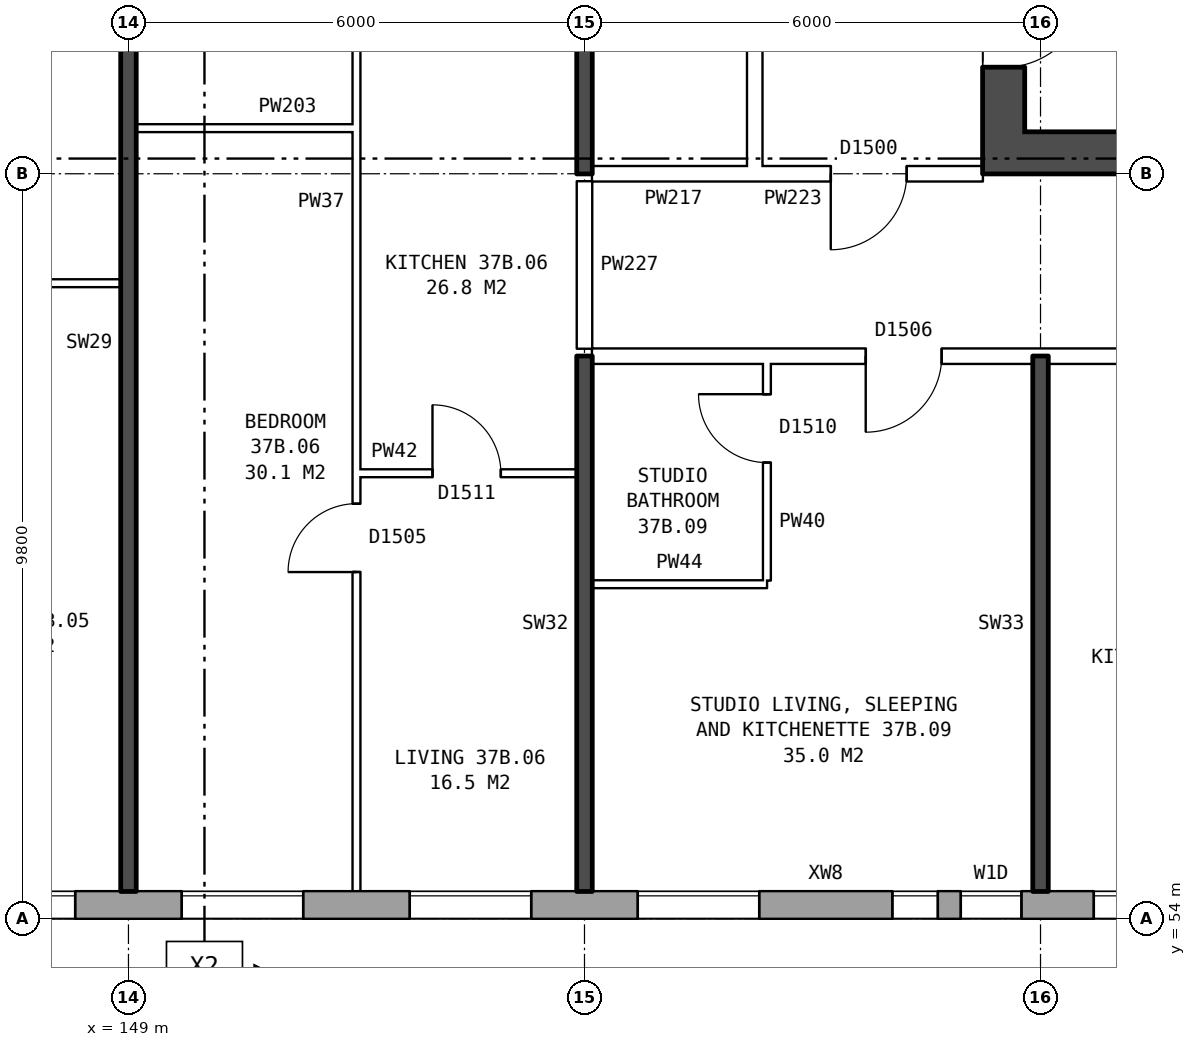
"""IFC4 building model, lengths in metres.
Left out: names, types, materials, properties, quantities, classifications, styles, units other than length and angle.
Written with IfcOpenShell. Run it as: python <this file> out.ifc"""

import sys

from ifc_helpers import new_model, si_unit, direction, frame, frame_2d, origin, place, context, subcontext, project, spatial, rectangle, extrude, element, fill, save


model = new_model("IFC4")
c1 = context("Model", 3, precision=1e-05, world=origin(), true_north=direction((0.0, 1.0)))
c2 = subcontext(c1, "Body", "Model", "MODEL_VIEW")
j1 = project(units=[si_unit("LENGTHUNIT", "METRE"), si_unit("PLANEANGLEUNIT", "RADIAN")], contexts=[c1])
p1 = place(None, origin())
s1 = spatial("IfcSite", under=j1, at=p1, CompositionType="ELEMENT")
p2 = place(p1, origin())
s2 = spatial("IfcBuilding", under=s1, at=p2, CompositionType="ELEMENT")
p3 = place(p2, frame((0.0, 0.0, 133.0)))
s3 = spatial("IfcBuildingStorey", under=s2, at=p3, CompositionType="ELEMENT", Elevation=133.0)
p4 = place(p3, frame((134.075, 54.18, 0.0), z_axis=(0.0, 0.0, 1.0), x_axis=(1.0, 0.0, 0.0)))
e1 = element("IfcWall", 1, at=p4, inside=s3, PredefinedType="STANDARD", context=c2, shape_type="SweptSolid", body=[
    extrude(rectangle(XDim=35.601, YDim=0.36, at=frame_2d((17.8, 0.0))), origin(), (0.0, 0.0, 1.0), 2.85),
])
p5 = place(p4, frame((0.625, 0.0, 0.8)))
e2 = element("IfcOpeningElement", 2, at=p5, cuts=e1, PredefinedType="OPENING", context=c2, shape_type="SweptSolid", body=[
    extrude(rectangle(XDim=1.6, YDim=1.8, at=frame_2d((0.8, 0.9))), frame((0.0, 0.19, 0.0), z_axis=(0.0, -1.0, 0.0), x_axis=(1.0, 0.0, 0.0)), (0.0, 0.0, 1.0), 0.38),
])
p6 = place(p4, frame((3.625, 0.0, 0.8)))
e3 = element("IfcOpeningElement", 3, at=p6, cuts=e1, PredefinedType="OPENING", context=c2, shape_type="SweptSolid", body=[
    extrude(rectangle(XDim=1.6, YDim=1.8, at=frame_2d((0.8, 0.9))), frame((0.0, 0.19, 0.0), z_axis=(0.0, -1.0, 0.0), x_axis=(1.0, 0.0, 0.0)), (0.0, 0.0, 1.0), 0.38),
])
p7 = place(p4, frame((6.625, 0.0, 0.8)))
e4 = element("IfcOpeningElement", 4, at=p7, cuts=e1, PredefinedType="OPENING", context=c2, shape_type="SweptSolid", body=[
    extrude(rectangle(XDim=1.6, YDim=1.8, at=frame_2d((0.8, 0.9))), frame((0.0, 0.19, 0.0), z_axis=(0.0, -1.0, 0.0), x_axis=(1.0, 0.0, 0.0)), (0.0, 0.0, 1.0), 0.38),
])
p8 = place(p4, frame((9.125, 0.0, 1.35)))
e5 = element("IfcOpeningElement", 5, at=p8, cuts=e1, PredefinedType="OPENING", context=c2, shape_type="SweptSolid", body=[
    extrude(rectangle(XDim=1.2, YDim=1.2, at=frame_2d((0.6, 0.6))), frame((0.0, 0.19, 0.0), z_axis=(0.0, -1.0, 0.0), x_axis=(1.0, 0.0, 0.0)), (0.0, 0.0, 1.0), 0.38),
])
p9 = place(p4, frame((12.625, 0.0, 0.8)))
e6 = element("IfcOpeningElement", 6, at=p9, cuts=e1, PredefinedType="OPENING", context=c2, shape_type="SweptSolid", body=[
    extrude(rectangle(XDim=1.6, YDim=1.8, at=frame_2d((0.8, 0.9))), frame((0.0, 0.19, 0.0), z_axis=(0.0, -1.0, 0.0), x_axis=(1.0, 0.0, 0.0)), (0.0, 0.0, 1.0), 0.38),
])
p10 = place(p4, frame((15.625, 0.0, 0.8)))
e7 = element("IfcOpeningElement", 7, at=p10, cuts=e1, PredefinedType="OPENING", context=c2, shape_type="SweptSolid", body=[
    extrude(rectangle(XDim=1.6, YDim=1.8, at=frame_2d((0.8, 0.9))), frame((0.0, 0.19, 0.0), z_axis=(0.0, -1.0, 0.0), x_axis=(1.0, 0.0, 0.0)), (0.0, 0.0, 1.0), 0.38),
])
p11 = place(p4, frame((18.625, 0.0, 0.8)))
e8 = element("IfcOpeningElement", 8, at=p11, cuts=e1, PredefinedType="OPENING", context=c2, shape_type="SweptSolid", body=[
    extrude(rectangle(XDim=1.6, YDim=1.8, at=frame_2d((0.8, 0.9))), frame((0.0, 0.19, 0.0), z_axis=(0.0, -1.0, 0.0), x_axis=(1.0, 0.0, 0.0)), (0.0, 0.0, 1.0), 0.38),
])
p12 = place(p4, frame((21.625, 0.0, 0.8)))
e9 = element("IfcOpeningElement", 9, at=p12, cuts=e1, PredefinedType="OPENING", context=c2, shape_type="SweptSolid", body=[
    extrude(rectangle(XDim=1.6, YDim=1.8, at=frame_2d((0.8, 0.9))), frame((0.0, 0.19, 0.0), z_axis=(0.0, -1.0, 0.0), x_axis=(1.0, 0.0, 0.0)), (0.0, 0.0, 1.0), 0.38),
])
p13 = place(p4, frame((24.975, 0.0, 1.7)))
e10 = element("IfcOpeningElement", 10, at=p13, cuts=e1, PredefinedType="OPENING", context=c2, shape_type="SweptSolid", body=[
    extrude(rectangle(XDim=0.6, YDim=0.9, at=frame_2d((0.3, 0.45))), frame((0.0, 0.19, 0.0), z_axis=(0.0, -1.0, 0.0), x_axis=(1.0, 0.0, 0.0)), (0.0, 0.0, 1.0), 0.38),
])
p14 = place(p4, frame((27.625, 0.0, 0.8)))
e11 = element("IfcOpeningElement", 11, at=p14, cuts=e1, PredefinedType="OPENING", context=c2, shape_type="SweptSolid", body=[
    extrude(rectangle(XDim=1.6, YDim=1.8, at=frame_2d((0.8, 0.9))), frame((0.0, 0.19, 0.0), z_axis=(0.0, -1.0, 0.0), x_axis=(1.0, 0.0, 0.0)), (0.0, 0.0, 1.0), 0.38),
])
p15 = place(p4, frame((30.625, 0.0, 0.8)))
e12 = element("IfcOpeningElement", 12, at=p15, cuts=e1, PredefinedType="OPENING", context=c2, shape_type="SweptSolid", body=[
    extrude(rectangle(XDim=1.6, YDim=1.8, at=frame_2d((0.8, 0.9))), frame((0.0, 0.19, 0.0), z_axis=(0.0, -1.0, 0.0), x_axis=(1.0, 0.0, 0.0)), (0.0, 0.0, 1.0), 0.38),
])
p16 = place(p4, frame((33.625, 0.0, 0.8)))
e13 = element("IfcOpeningElement", 13, at=p16, cuts=e1, PredefinedType="OPENING", context=c2, shape_type="SweptSolid", body=[
    extrude(rectangle(XDim=1.6, YDim=1.8, at=frame_2d((0.8, 0.9))), frame((0.0, 0.19, 0.0), z_axis=(0.0, -1.0, 0.0), x_axis=(1.0, 0.0, 0.0)), (0.0, 0.0, 1.0), 0.38),
])
p17 = place(p4, frame((11.125, 0.0, 0.15)))
e14 = element("IfcOpeningElement", 14, at=p17, cuts=e1, PredefinedType="OPENING", context=c2, shape_type="SweptSolid", body=[
    extrude(rectangle(XDim=0.6, YDim=0.9, at=frame_2d((0.3, 0.45))), frame((0.0, 0.19, 0.0), z_axis=(0.0, -1.0, 0.0), x_axis=(1.0, 0.0, 0.0)), (0.0, 0.0, 1.0), 0.38),
])
p18 = place(p4, frame((25.875, 0.0, 0.8)))
e15 = element("IfcOpeningElement", 15, at=p18, cuts=e1, PredefinedType="OPENING", context=c2, shape_type="SweptSolid", body=[
    extrude(rectangle(XDim=0.8, YDim=1.8, at=frame_2d((0.4, 0.9))), frame((0.0, 0.19, 0.0), z_axis=(0.0, -1.0, 0.0), x_axis=(1.0, 0.0, 0.0)), (0.0, 0.0, 1.0), 0.38),
])
p19 = place(p3, frame((160.515, 76.2, 0.0), z_axis=(0.0, 0.0, 1.0), x_axis=(0.0, -1.0, 0.0)))
e16 = element("IfcWall", 16, at=p19, inside=s3, PredefinedType="SHEAR", context=c2, shape_type="SweptSolid", body=[
    extrude(rectangle(XDim=12.4, YDim=0.55, at=frame_2d((6.2, 0.0))), origin(), (0.0, 0.0, 1.0), 2.85),
])
p20 = place(p19, frame((1.325, 0.0, 0.0)))
e17 = element("IfcOpeningElement", 17, at=p20, cuts=e16, PredefinedType="OPENING", context=c2, shape_type="SweptSolid", body=[
    extrude(rectangle(XDim=1.1, YDim=2.1, at=frame_2d((0.55, 1.05))), frame((0.0, 0.285, 0.0), z_axis=(0.0, -1.0, 0.0), x_axis=(1.0, 0.0, 0.0)), (0.0, 0.0, 1.0), 0.57),
])
p21 = place(p19, frame((4.025, 0.0, 0.0)))
e18 = element("IfcOpeningElement", 18, at=p21, cuts=e16, PredefinedType="OPENING", context=c2, shape_type="SweptSolid", body=[
    extrude(rectangle(XDim=0.85, YDim=2.1, at=frame_2d((0.425, 1.05))), frame((0.0, 0.285, 0.0), z_axis=(0.0, -1.0, 0.0), x_axis=(1.0, 0.0, 0.0)), (0.0, 0.0, 1.0), 0.57),
])
p22 = place(p19, frame((6.175, 0.0, 0.0)))
e19 = element("IfcOpeningElement", 19, at=p22, cuts=e16, PredefinedType="OPENING", context=c2, shape_type="SweptSolid", body=[
    extrude(rectangle(XDim=0.85, YDim=2.1, at=frame_2d((0.425, 1.05))), frame((0.0, 0.285, 0.0), z_axis=(0.0, -1.0, 0.0), x_axis=(1.0, 0.0, 0.0)), (0.0, 0.0, 1.0), 0.57),
])
p23 = place(p19, frame((9.9, 0.0, 0.0)))
e20 = element("IfcOpeningElement", 20, at=p23, cuts=e16, PredefinedType="OPENING", context=c2, shape_type="SweptSolid", body=[
    extrude(rectangle(XDim=1.1, YDim=2.1, at=frame_2d((0.55, 1.05))), frame((0.0, 0.285, 0.0), z_axis=(0.0, -1.0, 0.0), x_axis=(1.0, 0.0, 0.0)), (0.0, 0.0, 1.0), 0.57),
])
p24 = place(p19, frame((8.125, 0.0, 0.0)))
e21 = element("IfcOpeningElement", 21, at=p24, cuts=e16, PredefinedType="OPENING", context=c2, shape_type="SweptSolid", body=[
    extrude(rectangle(XDim=0.85, YDim=2.1, at=frame_2d((0.425, 1.05))), frame((0.0, 0.285, 0.0), z_axis=(0.0, -1.0, 0.0), x_axis=(1.0, 0.0, 0.0)), (0.0, 0.0, 1.0), 0.57),
])
p25 = place(p3, frame((160.79, 64.075, 0.0), z_axis=(0.0, 0.0, 1.0), x_axis=(1.0, 0.0, 0.0)))
e22 = element("IfcWall", 22, at=p25, inside=s3, PredefinedType="SHEAR", context=c2, shape_type="SweptSolid", body=[
    extrude(rectangle(XDim=7.3, YDim=0.55, at=frame_2d((3.65, 0.0))), origin(), (0.0, 0.0, 1.0), 2.85),
])
p26 = place(p3, frame((157.24, 63.9, 0.0), z_axis=(0.0, 0.0, 1.0), x_axis=(0.0, 1.0, 0.0)))
e23 = element("IfcWall", 23, at=p26, inside=s3, PredefinedType="PARTITIONING", context=c2, shape_type="SweptSolid", body=[
    extrude(rectangle(XDim=12.2, YDim=0.2, at=frame_2d((6.1, 0.0))), origin(), (0.0, 0.0, 1.0), 2.85),
])
p27 = place(p26, frame((5.1, 0.0, 0.0)))
e24 = element("IfcOpeningElement", 24, at=p27, cuts=e23, PredefinedType="OPENING", context=c2, shape_type="SweptSolid", body=[
    extrude(rectangle(XDim=2.0, YDim=2.1, at=frame_2d((1.0, 1.05))), frame((0.0, 0.11, 0.0), z_axis=(0.0, -1.0, 0.0), x_axis=(1.0, 0.0, 0.0)), (0.0, 0.0, 1.0), 0.22),
])
p28 = place(p3, frame((155.1, 58.4, 0.0), z_axis=(0.0, 0.0, 1.0), x_axis=(1.0, 0.0, 0.0)))
e25 = element("IfcWall", 25, at=p28, inside=s3, PredefinedType="PARTITIONING", context=c2, shape_type="SweptSolid", body=[
    extrude(rectangle(XDim=2.3, YDim=0.1, at=frame_2d((1.15, 0.0))), origin(), (0.0, 0.0, 1.0), 2.85),
])
p29 = place(p3, frame((152.0, 59.86, 0.0), z_axis=(0.0, 0.0, 1.0), x_axis=(1.0, 0.0, 0.0)))
e26 = element("IfcWall", 26, at=p29, inside=s3, PredefinedType="PARTITIONING", context=c2, shape_type="SweptSolid", body=[
    extrude(rectangle(XDim=2.9, YDim=0.1, at=frame_2d((1.45, 0.0))), origin(), (0.0, 0.0, 1.0), 2.85),
])
p30 = place(p29, frame((1.0, 0.0, 0.0)))
e27 = element("IfcOpeningElement", 27, at=p30, cuts=e26, PredefinedType="OPENING", context=c2, shape_type="SweptSolid", body=[
    extrude(rectangle(XDim=0.9, YDim=2.1, at=frame_2d((0.45, 1.05))), frame((0.0, 0.06, 0.0), z_axis=(0.0, -1.0, 0.0), x_axis=(1.0, 0.0, 0.0)), (0.0, 0.0, 1.0), 0.12),
])
p31 = place(p3, frame((155.1, 61.4, 0.0), z_axis=(0.0, 0.0, 1.0), x_axis=(1.0, 0.0, 0.0)))
e28 = element("IfcWall", 28, at=p31, inside=s3, PredefinedType="PARTITIONING", context=c2, shape_type="SweptSolid", body=[
    extrude(rectangle(XDim=17.29, YDim=0.2, at=frame_2d((8.645, 0.0))), origin(), (0.0, 0.0, 1.0), 2.85),
])
p32 = place(p31, frame((3.6, 0.0, 0.0)))
e29 = element("IfcOpeningElement", 29, at=p32, cuts=e28, PredefinedType="OPENING", context=c2, shape_type="SweptSolid", body=[
    extrude(rectangle(XDim=1.0, YDim=2.1, at=frame_2d((0.5, 1.05))), frame((0.0, 0.11, 0.0), z_axis=(0.0, -1.0, 0.0), x_axis=(1.0, 0.0, 0.0)), (0.0, 0.0, 1.0), 0.22),
])
p33 = place(p31, frame((8.4, 0.0, 0.0)))
e30 = element("IfcOpeningElement", 30, at=p33, cuts=e28, PredefinedType="OPENING", context=c2, shape_type="SweptSolid", body=[
    extrude(rectangle(XDim=1.0, YDim=2.1, at=frame_2d((0.5, 1.05))), frame((0.0, 0.11, 0.0), z_axis=(0.0, -1.0, 0.0), x_axis=(1.0, 0.0, 0.0)), (0.0, 0.0, 1.0), 0.22),
])
p34 = place(p3, frame((146.0, 62.36, 0.0), z_axis=(0.0, 0.0, 1.0), x_axis=(1.0, 0.0, 0.0)))
e31 = element("IfcWall", 31, at=p34, inside=s3, PredefinedType="PARTITIONING", context=c2, shape_type="SweptSolid", body=[
    extrude(rectangle(XDim=2.9, YDim=0.1, at=frame_2d((1.45, 0.0))), origin(), (0.0, 0.0, 1.0), 2.85),
])
p35 = place(p34, frame((1.0, 0.0, 0.0)))
e32 = element("IfcOpeningElement", 32, at=p35, cuts=e31, PredefinedType="OPENING", context=c2, shape_type="SweptSolid", body=[
    extrude(rectangle(XDim=0.9, YDim=2.1, at=frame_2d((0.45, 1.05))), frame((0.0, 0.06, 0.0), z_axis=(0.0, -1.0, 0.0), x_axis=(1.0, 0.0, 0.0)), (0.0, 0.0, 1.0), 0.12),
])
p36 = place(p3, frame((155.1, 63.8, 0.0), z_axis=(0.0, 0.0, 1.0), x_axis=(1.0, 0.0, 0.0)))
e33 = element("IfcWall", 33, at=p36, inside=s3, PredefinedType="PARTITIONING", context=c2, shape_type="SweptSolid", body=[
    extrude(rectangle(XDim=2.14, YDim=0.2, at=frame_2d((1.07, 0.0))), origin(), (0.0, 0.0, 1.0), 2.85),
])
p37 = place(p3, frame((157.24, 63.8, 0.0), z_axis=(0.0, 0.0, 1.0), x_axis=(1.0, 0.0, 0.0)))
e34 = element("IfcWall", 34, at=p37, inside=s3, PredefinedType="PARTITIONING", context=c2, shape_type="SweptSolid", body=[
    extrude(rectangle(XDim=3.0, YDim=0.2, at=frame_2d((1.5, 0.0))), origin(), (0.0, 0.0, 1.0), 2.85),
])
p38 = place(p37, frame((1.0, 0.0, 0.0)))
e35 = element("IfcOpeningElement", 35, at=p38, cuts=e34, PredefinedType="OPENING", context=c2, shape_type="SweptSolid", body=[
    extrude(rectangle(XDim=1.0, YDim=2.1, at=frame_2d((0.5, 1.05))), frame((0.0, 0.11, 0.0), z_axis=(0.0, -1.0, 0.0), x_axis=(1.0, 0.0, 0.0)), (0.0, 0.0, 1.0), 0.22),
])
p39 = place(p3, frame((149.1, 64.4, 0.0), z_axis=(0.0, 0.0, 1.0), x_axis=(1.0, 0.0, 0.0)))
e36 = element("IfcWall", 36, at=p39, inside=s3, PredefinedType="PARTITIONING", context=c2, shape_type="SweptSolid", body=[
    extrude(rectangle(XDim=2.9, YDim=0.1, at=frame_2d((1.45, 0.0))), origin(), (0.0, 0.0, 1.0), 2.85),
])
p40 = place(p3, frame((149.0, 54.36, 0.0), z_axis=(0.0, 0.0, 1.0), x_axis=(0.0, 1.0, 0.0)))
e37 = element("IfcWall", 37, at=p40, inside=s3, PredefinedType="SOLIDWALL", context=c2, shape_type="SweptSolid", body=[
    extrude(rectangle(XDim=14.44, YDim=0.2, at=frame_2d((7.22, 0.0))), origin(), (0.0, 0.0, 1.0), 2.85),
])
p41 = place(p3, frame((152.0, 54.36, 0.0), z_axis=(0.0, 0.0, 1.0), x_axis=(0.0, 1.0, 0.0)))
e38 = element("IfcWall", 38, at=p41, inside=s3, PredefinedType="PARTITIONING", context=c2, shape_type="SweptSolid", body=[
    extrude(rectangle(XDim=14.34, YDim=0.1, at=frame_2d((7.17, 0.0))), origin(), (0.0, 0.0, 1.0), 2.85),
])
p42 = place(p41, frame((4.2, 0.0, 0.0)))
e39 = element("IfcOpeningElement", 39, at=p42, cuts=e38, PredefinedType="OPENING", context=c2, shape_type="SweptSolid", body=[
    extrude(rectangle(XDim=0.9, YDim=2.1, at=frame_2d((0.45, 1.05))), frame((0.0, 0.06, 0.0), z_axis=(0.0, -1.0, 0.0), x_axis=(1.0, 0.0, 0.0)), (0.0, 0.0, 1.0), 0.12),
])
p43 = place(p41, frame((13.04, 0.0, 0.0)))
e40 = element("IfcOpeningElement", 40, at=p43, cuts=e38, PredefinedType="OPENING", context=c2, shape_type="SweptSolid", body=[
    extrude(rectangle(XDim=0.9, YDim=2.1, at=frame_2d((0.45, 1.05))), frame((0.0, 0.06, 0.0), z_axis=(0.0, -1.0, 0.0), x_axis=(1.0, 0.0, 0.0)), (0.0, 0.0, 1.0), 0.12),
])
p44 = place(p3, frame((155.0, 54.36, 0.0), z_axis=(0.0, 0.0, 1.0), x_axis=(0.0, 1.0, 0.0)))
e41 = element("IfcWall", 41, at=p44, inside=s3, PredefinedType="SOLIDWALL", context=c2, shape_type="SweptSolid", body=[
    extrude(rectangle(XDim=7.04, YDim=0.2, at=frame_2d((3.52, 0.0))), origin(), (0.0, 0.0, 1.0), 2.85),
])
p45 = place(p3, frame((155.0, 61.5, 0.0), z_axis=(0.0, 0.0, 1.0), x_axis=(0.0, 1.0, 0.0)))
e42 = element("IfcWall", 42, at=p45, inside=s3, PredefinedType="PARTITIONING", context=c2, shape_type="SweptSolid", body=[
    extrude(rectangle(XDim=2.2, YDim=0.2, at=frame_2d((1.1, 0.0))), origin(), (0.0, 0.0, 1.0), 2.85),
])
p46 = place(p3, frame((155.0, 63.8, 0.0), z_axis=(0.0, 0.0, 1.0), x_axis=(0.0, 1.0, 0.0)))
e43 = element("IfcWall", 43, at=p46, inside=s3, PredefinedType="SOLIDWALL", context=c2, shape_type="SweptSolid", body=[
    extrude(rectangle(XDim=5.0, YDim=0.2, at=frame_2d((2.5, 0.0))), origin(), (0.0, 0.0, 1.0), 2.85),
])
p47 = place(p3, frame((157.4, 58.45, 0.0), z_axis=(0.0, 0.0, 1.0), x_axis=(0.0, 1.0, 0.0)))
e44 = element("IfcWall", 44, at=p47, inside=s3, PredefinedType="PARTITIONING", context=c2, shape_type="SweptSolid", body=[
    extrude(rectangle(XDim=2.85, YDim=0.1, at=frame_2d((1.425, 0.0))), origin(), (0.0, 0.0, 1.0), 2.85),
])
p48 = place(p47, frame((1.55, 0.0, 0.0)))
e45 = element("IfcOpeningElement", 45, at=p48, cuts=e44, PredefinedType="OPENING", context=c2, shape_type="SweptSolid", body=[
    extrude(rectangle(XDim=0.9, YDim=2.1, at=frame_2d((0.45, 1.05))), frame((0.0, 0.06, 0.0), z_axis=(0.0, -1.0, 0.0), x_axis=(1.0, 0.0, 0.0)), (0.0, 0.0, 1.0), 0.12),
])
p49 = place(p3, frame((161.0, 54.36, 0.0), z_axis=(0.0, 0.0, 1.0), x_axis=(0.0, 1.0, 0.0)))
e46 = element("IfcWall", 46, at=p49, inside=s3, PredefinedType="SOLIDWALL", context=c2, shape_type="SweptSolid", body=[
    extrude(rectangle(XDim=7.04, YDim=0.2, at=frame_2d((3.52, 0.0))), origin(), (0.0, 0.0, 1.0), 2.85),
])
p50 = place(p9, origin())
e47 = element("IfcWindow", 47, at=p50, inside=s3, PartitioningType="SINGLE_PANEL", PredefinedType="WINDOW", context=c2, shape_type="SweptSolid", body=[
    extrude(rectangle(XDim=1.6, YDim=1.8, at=frame_2d((0.8, 0.9))), frame((0.0, 0.15, 0.0), z_axis=(0.0, -1.0, 0.0), x_axis=(1.0, 0.0, 0.0)), (0.0, 0.0, 1.0), 0.06),
])
fill(e6, e47)
p51 = place(p10, origin())
e48 = element("IfcWindow", 48, at=p51, inside=s3, PartitioningType="SINGLE_PANEL", PredefinedType="WINDOW", context=c2, shape_type="SweptSolid", body=[
    extrude(rectangle(XDim=1.6, YDim=1.8, at=frame_2d((0.8, 0.9))), frame((0.0, 0.15, 0.0), z_axis=(0.0, -1.0, 0.0), x_axis=(1.0, 0.0, 0.0)), (0.0, 0.0, 1.0), 0.06),
])
fill(e7, e48)
p52 = place(p11, origin())
e49 = element("IfcWindow", 49, at=p52, inside=s3, PartitioningType="SINGLE_PANEL", PredefinedType="WINDOW", context=c2, shape_type="SweptSolid", body=[
    extrude(rectangle(XDim=1.6, YDim=1.8, at=frame_2d((0.8, 0.9))), frame((0.0, 0.15, 0.0), z_axis=(0.0, -1.0, 0.0), x_axis=(1.0, 0.0, 0.0)), (0.0, 0.0, 1.0), 0.06),
])
fill(e8, e49)
p53 = place(p12, origin())
e50 = element("IfcWindow", 50, at=p53, inside=s3, PartitioningType="SINGLE_PANEL", PredefinedType="WINDOW", context=c2, shape_type="SweptSolid", body=[
    extrude(rectangle(XDim=1.6, YDim=1.8, at=frame_2d((0.8, 0.9))), frame((0.0, 0.15, 0.0), z_axis=(0.0, -1.0, 0.0), x_axis=(1.0, 0.0, 0.0)), (0.0, 0.0, 1.0), 0.06),
])
fill(e9, e50)
p54 = place(p13, origin())
e51 = element("IfcWindow", 51, at=p54, inside=s3, PartitioningType="SINGLE_PANEL", PredefinedType="WINDOW", context=c2, shape_type="SweptSolid", body=[
    extrude(rectangle(XDim=0.6, YDim=0.9, at=frame_2d((0.3, 0.45))), frame((0.0, 0.15, 0.0), z_axis=(0.0, -1.0, 0.0), x_axis=(1.0, 0.0, 0.0)), (0.0, 0.0, 1.0), 0.06),
])
fill(e10, e51)
p55 = place(p14, origin())
e52 = element("IfcWindow", 52, at=p55, inside=s3, PartitioningType="SINGLE_PANEL", PredefinedType="WINDOW", context=c2, shape_type="SweptSolid", body=[
    extrude(rectangle(XDim=1.6, YDim=1.8, at=frame_2d((0.8, 0.9))), frame((0.0, 0.15, 0.0), z_axis=(0.0, -1.0, 0.0), x_axis=(1.0, 0.0, 0.0)), (0.0, 0.0, 1.0), 0.06),
])
fill(e11, e52)
p56 = place(p23, origin())
e53 = element("IfcDoor", 53, at=p56, inside=s3, OperationType="SINGLE_SWING_LEFT", PredefinedType="DOOR", context=c2, shape_type="SweptSolid", body=[
    extrude(rectangle(XDim=1.1, YDim=2.1, at=frame_2d((0.55, 1.05))), frame((0.0, 0.26, 0.0), z_axis=(0.0, -1.0, 0.0), x_axis=(1.0, 0.0, 0.0)), (0.0, 0.0, 1.0), 0.05),
])
fill(e20, e53)
p57 = place(p38, frame((1.0, 0.0, 0.0), z_axis=(0.0, 0.0, 1.0), x_axis=(-1.0, 0.0, 0.0)))
e54 = element("IfcDoor", 54, at=p57, inside=s3, OperationType="SINGLE_SWING_RIGHT", PredefinedType="DOOR", context=c2, shape_type="SweptSolid", body=[
    extrude(rectangle(XDim=1.0, YDim=2.1, at=frame_2d((0.5, 1.05))), frame((0.0, 0.025, 0.0), z_axis=(0.0, -1.0, 0.0), x_axis=(1.0, 0.0, 0.0)), (0.0, 0.0, 1.0), 0.05),
])
fill(e35, e54)
p58 = place(p42, origin())
e55 = element("IfcDoor", 55, at=p58, inside=s3, OperationType="SINGLE_SWING_LEFT", PredefinedType="DOOR", context=c2, shape_type="SweptSolid", body=[
    extrude(rectangle(XDim=0.9, YDim=2.1, at=frame_2d((0.45, 1.05))), frame((0.0, 0.025, 0.0), z_axis=(0.0, -1.0, 0.0), x_axis=(1.0, 0.0, 0.0)), (0.0, 0.0, 1.0), 0.05),
])
fill(e39, e55)
p59 = place(p30, origin())
e56 = element("IfcDoor", 56, at=p59, inside=s3, OperationType="SINGLE_SWING_LEFT", PredefinedType="DOOR", context=c2, shape_type="SweptSolid", body=[
    extrude(rectangle(XDim=0.9, YDim=2.1, at=frame_2d((0.45, 1.05))), frame((0.0, 0.025, 0.0), z_axis=(0.0, -1.0, 0.0), x_axis=(1.0, 0.0, 0.0)), (0.0, 0.0, 1.0), 0.05),
])
fill(e27, e56)
p60 = place(p32, frame((1.0, 0.0, 0.0), z_axis=(0.0, 0.0, 1.0), x_axis=(-1.0, 0.0, 0.0)))
e57 = element("IfcDoor", 57, at=p60, inside=s3, OperationType="SINGLE_SWING_RIGHT", PredefinedType="DOOR", context=c2, shape_type="SweptSolid", body=[
    extrude(rectangle(XDim=1.0, YDim=2.1, at=frame_2d((0.5, 1.05))), frame((0.0, 0.025, 0.0), z_axis=(0.0, -1.0, 0.0), x_axis=(1.0, 0.0, 0.0)), (0.0, 0.0, 1.0), 0.05),
])
fill(e29, e57)
p61 = place(p48, origin())
e58 = element("IfcDoor", 58, at=p61, inside=s3, OperationType="SINGLE_SWING_RIGHT", PredefinedType="DOOR", context=c2, shape_type="SweptSolid", body=[
    extrude(rectangle(XDim=0.9, YDim=2.1, at=frame_2d((0.45, 1.05))), frame((0.0, 0.025, 0.0), z_axis=(0.0, -1.0, 0.0), x_axis=(1.0, 0.0, 0.0)), (0.0, 0.0, 1.0), 0.05),
])
fill(e45, e58)
p62 = place(p18, origin())
e59 = element("IfcWindow", 59, at=p62, inside=s3, PartitioningType="SINGLE_PANEL", PredefinedType="WINDOW", context=c2, shape_type="SweptSolid", body=[
    extrude(rectangle(XDim=0.8, YDim=1.8, at=frame_2d((0.4, 0.9))), frame((0.0, 0.15, 0.0), z_axis=(0.0, -1.0, 0.0), x_axis=(1.0, 0.0, 0.0)), (0.0, 0.0, 1.0), 0.06),
])
fill(e15, e59)
save(model, sys.argv[1])
